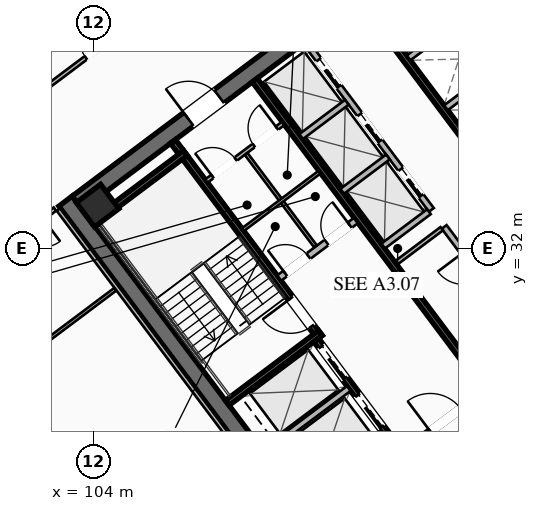
"""IFC4 building model, lengths in metres.
Left out: names, types, materials, properties, quantities, classifications, styles, units other than length and angle.
Written with IfcOpenShell. Run it as: python <this file> out.ifc"""

import sys

from ifc_helpers import new_model, si_unit, direction, frame, frame_2d, origin, origin_2d, place, context, subcontext, project, spatial, rectangle, hollow_rectangle, extrude, element, fill, save


model = new_model("IFC4")
c1 = context("Model", 3, precision=1e-05, world=origin(), true_north=direction((0.0, 1.0)))
c2 = subcontext(c1, "Body", "Model", "MODEL_VIEW")
j1 = project(units=[si_unit("LENGTHUNIT", "METRE"), si_unit("PLANEANGLEUNIT", "RADIAN")], contexts=[c1])
p1 = place(None, origin())
s1 = spatial("IfcSite", under=j1, at=p1, CompositionType="ELEMENT")
p2 = place(p1, origin())
s2 = spatial("IfcBuilding", under=s1, at=p2, CompositionType="ELEMENT")
p3 = place(p2, frame((0.0, 0.0, 146.35)))
s3 = spatial("IfcBuildingStorey", under=s2, at=p3, CompositionType="ELEMENT", Elevation=146.35)
for number, where, z_axis, x_axis in (
    (1, (112.436, 21.077, 0.0), (0.0, 0.0, 1.0), (-0.6, 0.8, 0.0)),
    (2, (115.564, 42.923, 0.0), (0.0, 0.0, 1.0), (0.6, -0.8, 0.0)),
):
    element("IfcWall", number, at=place(p3, frame(where, z_axis=z_axis, x_axis=x_axis)), inside=s3, PredefinedType="SHEAR", context=c2, shape_type="SweptSolid", body=[
        extrude(rectangle(XDim=15.6, YDim=0.55, at=frame_2d((7.8, 0.0))), origin(), (0.0, 0.0, 1.0), 3.55),
    ])
p4 = place(p3, frame((124.539, 30.498, 0.0), z_axis=(0.0, 0.0, 1.0), x_axis=(-0.799998054672, -0.600002593761, 0.0)))
e3 = element("IfcWall", 3, at=p4, inside=s3, PredefinedType="SHEAR", context=c2, shape_type="SweptSolid", body=[
    extrude(rectangle(XDim=15.06, YDim=0.55, at=frame_2d((7.53, 0.0))), origin(), (0.0, 0.0, 1.0), 3.55),
])
p5 = place(p4, frame((9.23, 0.0, 0.0)))
e4 = element("IfcOpeningElement", 4, at=p5, cuts=e3, PredefinedType="OPENING", context=c2, shape_type="SweptSolid", body=[
    extrude(rectangle(XDim=1.25, YDim=2.25, at=frame_2d((0.625, 1.125))), frame((0.0, 0.285, 0.0), z_axis=(0.0, -1.0, 0.0), x_axis=(1.0, 0.0, 0.0)), (0.0, 0.0, 1.0), 0.57),
])
p6 = place(p4, frame((4.18, 0.0, 0.0)))
e5 = element("IfcOpeningElement", 5, at=p6, cuts=e3, PredefinedType="OPENING", context=c2, shape_type="SweptSolid", body=[
    extrude(rectangle(XDim=1.25, YDim=2.25, at=frame_2d((0.625, 1.125))), frame((0.0, 0.285, 0.0), z_axis=(0.0, -1.0, 0.0), x_axis=(1.0, 0.0, 0.0)), (0.0, 0.0, 1.0), 0.57),
])
p7 = place(p3, frame((103.461, 33.502, 0.0), z_axis=(0.0, 0.0, 1.0), x_axis=(0.799998054672, 0.600002593761, 0.0)))
e6 = element("IfcWall", 6, at=p7, inside=s3, PredefinedType="SHEAR", context=c2, shape_type="SweptSolid", body=[
    extrude(rectangle(XDim=15.06, YDim=0.55, at=frame_2d((7.53, 0.0))), origin(), (0.0, 0.0, 1.0), 3.55),
])
p8 = place(p7, frame((4.58, 0.0, 0.0)))
e7 = element("IfcOpeningElement", 7, at=p8, cuts=e6, PredefinedType="OPENING", context=c2, shape_type="SweptSolid", body=[
    extrude(rectangle(XDim=1.25, YDim=2.25, at=frame_2d((0.625, 1.125))), frame((0.0, 0.285, 0.0), z_axis=(0.0, -1.0, 0.0), x_axis=(1.0, 0.0, 0.0)), (0.0, 0.0, 1.0), 0.57),
])
p9 = place(p7, frame((9.63, 0.0, 0.0)))
e8 = element("IfcOpeningElement", 8, at=p9, cuts=e6, PredefinedType="OPENING", context=c2, shape_type="SweptSolid", body=[
    extrude(rectangle(XDim=1.25, YDim=2.25, at=frame_2d((0.625, 1.125))), frame((0.0, 0.285, 0.0), z_axis=(0.0, -1.0, 0.0), x_axis=(1.0, 0.0, 0.0)), (0.0, 0.0, 1.0), 0.57),
])
p10 = place(p3, frame((104.13, 33.41, 0.0), z_axis=(0.0, 0.0, 1.0), x_axis=(0.799999996291, 0.600000004945, 0.0)))
e9 = element("IfcColumn", 9, at=p10, inside=s3, PredefinedType="COLUMN", context=c2, shape_type="SweptSolid", body=[
    extrude(hollow_rectangle(XDim=1.0, YDim=1.0, WallThickness=0.04, at=origin_2d()), origin(), (0.0, 0.0, 1.0), 3.37),
])
p11 = place(p3, frame((111.44, 29.08, 0.0), z_axis=(0.0, 0.0, 1.0), x_axis=(-0.59999029481, 0.8000072788, 0.0)))
e10 = element("IfcWall", 10, at=p11, inside=s3, PredefinedType="SHEAR", context=c2, shape_type="SweptSolid", body=[
    extrude(rectangle(XDim=8.05, YDim=0.2, at=frame_2d((4.025, 0.0))), origin(), (0.0, 0.0, 1.0), 3.37),
])
p12 = place(p11, frame((0.45, 0.0, 0.0)))
e11 = element("IfcOpeningElement", 11, at=p12, cuts=e10, PredefinedType="OPENING", context=c2, shape_type="SweptSolid", body=[
    extrude(rectangle(XDim=1.15, YDim=2.2, at=frame_2d((0.575, 1.1))), frame((0.0, 0.11, 0.0), z_axis=(0.0, -1.0, 0.0), x_axis=(1.0, 0.0, 0.0)), (0.0, 0.0, 1.0), 0.22),
])
for number, where, z_axis, x_axis in (
    (12, (108.396, 26.922, 0.0), (0.0, 0.0, 1.0), (0.8, 0.6, 0.0)),
    (13, (103.956, 32.842, 0.0), (0.0, 0.0, 1.0), (0.8, 0.6, 0.0)),
):
    element("IfcWall", number, at=place(p3, frame(where, z_axis=z_axis, x_axis=x_axis)), inside=s3, PredefinedType="SHEAR", context=c2, shape_type="SweptSolid", body=[
        extrude(rectangle(XDim=3.83, YDim=0.2, at=frame_2d((1.915, 0.0))), origin(), (0.0, 0.0, 1.0), 3.37),
    ])
p13 = place(p3, frame((117.998, 25.936, 0.0), z_axis=(0.0, 0.0, 1.0), x_axis=(-0.600002693989, 0.799997979501, 0.0)))
e14 = element("IfcWall", 14, at=p13, inside=s3, PredefinedType="SHEAR", context=c2, shape_type="SweptSolid", body=[
    extrude(rectangle(XDim=14.5, YDim=0.2, at=frame_2d((7.25, 0.0))), origin(), (0.0, 0.0, 1.0), 3.37),
])
p14 = place(p3, frame((110.104, 31.028, 0.0), z_axis=(0.0, 0.0, 1.0), x_axis=(0.800018601094, 0.59997519774, 0.0)))
e15 = element("IfcWall", 15, at=p14, inside=s3, PredefinedType="SOLIDWALL", context=c2, shape_type="SweptSolid", body=[
    extrude(rectangle(XDim=3.15, YDim=0.22, at=frame_2d((1.575, 0.0))), origin(), (0.0, 0.0, 1.0), 2.723),
])
p15 = place(p14, frame((0.25, 0.0, 0.0)))
e16 = element("IfcOpeningElement", 16, at=p15, cuts=e15, PredefinedType="OPENING", context=c2, shape_type="SweptSolid", body=[
    extrude(rectangle(XDim=0.95, YDim=2.05, at=frame_2d((0.475, 1.025))), frame((0.0, 0.12, 0.0), z_axis=(0.0, -1.0, 0.0), x_axis=(1.0, 0.0, 0.0)), (0.0, 0.0, 1.0), 0.24),
])
p16 = place(p14, frame((1.95, 0.0, 0.0)))
e17 = element("IfcOpeningElement", 17, at=p16, cuts=e15, PredefinedType="OPENING", context=c2, shape_type="SweptSolid", body=[
    extrude(rectangle(XDim=0.95, YDim=2.05, at=frame_2d((0.475, 1.025))), frame((0.0, 0.12, 0.0), z_axis=(0.0, -1.0, 0.0), x_axis=(1.0, 0.0, 0.0)), (0.0, 0.0, 1.0), 0.24),
])
p17 = place(p3, frame((114.316, 25.412, 0.0), z_axis=(0.0, 0.0, 1.0), x_axis=(0.800018601094, 0.59997519774, 0.0)))
e18 = element("IfcWall", 18, at=p17, inside=s3, PredefinedType="SOLIDWALL", context=c2, shape_type="SweptSolid", body=[
    extrude(rectangle(XDim=3.15, YDim=0.22, at=frame_2d((1.575, 0.0))), origin(), (0.0, 0.0, 1.0), 2.723),
])
p18 = place(p17, frame((0.95, 0.0, 0.0)))
e19 = element("IfcOpeningElement", 19, at=p18, cuts=e18, PredefinedType="OPENING", context=c2, shape_type="SweptSolid", body=[
    extrude(rectangle(XDim=1.25, YDim=2.25, at=frame_2d((0.625, 1.125))), frame((0.0, 0.12, 0.0), z_axis=(0.0, -1.0, 0.0), x_axis=(1.0, 0.0, 0.0)), (0.0, 0.0, 1.0), 0.24),
])
p19 = place(p3, frame((115.19, 23.83, 0.0), z_axis=(0.0, 0.0, 1.0), x_axis=(-0.599993943644, 0.800004542231, 0.0)))
e20 = element("IfcWall", 20, at=p19, inside=s3, PredefinedType="SHEAR", context=c2, shape_type="SweptSolid", body=[
    extrude(rectangle(XDim=6.45, YDim=0.2, at=frame_2d((3.225, 0.0))), origin(), (0.0, 0.0, 1.0), 3.37),
])
p20 = place(p19, frame((4.875, 0.0, 0.0)))
e21 = element("IfcOpeningElement", 21, at=p20, cuts=e20, PredefinedType="OPENING", context=c2, shape_type="SweptSolid", body=[
    extrude(rectangle(XDim=1.3, YDim=2.25, at=frame_2d((0.65, 1.125))), frame((0.0, 0.11, 0.0), z_axis=(0.0, -1.0, 0.0), x_axis=(1.0, 0.0, 0.0)), (0.0, 0.0, 1.0), 0.22),
])
p21 = place(p19, frame((2.875, 0.0, 0.0)))
e22 = element("IfcOpeningElement", 22, at=p21, cuts=e20, PredefinedType="OPENING", context=c2, shape_type="SweptSolid", body=[
    extrude(rectangle(XDim=1.3, YDim=2.25, at=frame_2d((0.65, 1.125))), frame((0.0, 0.11, 0.0), z_axis=(0.0, -1.0, 0.0), x_axis=(1.0, 0.0, 0.0)), (0.0, 0.0, 1.0), 0.22),
])
p22 = place(p19, frame((0.675, 0.0, 0.0)))
e23 = element("IfcOpeningElement", 23, at=p22, cuts=e20, PredefinedType="OPENING", context=c2, shape_type="SweptSolid", body=[
    extrude(rectangle(XDim=1.3, YDim=2.25, at=frame_2d((0.65, 1.125))), frame((0.0, 0.11, 0.0), z_axis=(0.0, -1.0, 0.0), x_axis=(1.0, 0.0, 0.0)), (0.0, 0.0, 1.0), 0.22),
])
p23 = place(p3, frame((109.608, 25.306, 0.0), z_axis=(0.0, 0.0, 1.0), x_axis=(0.8, 0.6, 0.0)))
e24 = element("IfcWall", 24, at=p23, inside=s3, PredefinedType="SOLIDWALL", context=c2, shape_type="SweptSolid", body=[
    extrude(rectangle(XDim=3.48, YDim=0.2, at=frame_2d((1.74, 0.0))), origin(), (0.0, 0.0, 1.0), 3.37),
])
p24 = place(p3, frame((112.81, 40.17, 0.0), z_axis=(0.0, 0.0, 1.0), x_axis=(0.599993943644, -0.800004542231, 0.0)))
e25 = element("IfcWall", 25, at=p24, inside=s3, PredefinedType="SHEAR", context=c2, shape_type="SweptSolid", body=[
    extrude(rectangle(XDim=6.45, YDim=0.2, at=frame_2d((3.225, 0.0))), origin(), (0.0, 0.0, 1.0), 3.37),
])
for number, where, z_axis, x_axis in (
    (26, (115.59, 36.63, 0.0), (0.0, 0.0, 1.0), (0.8, 0.6, 0.0)),
    (27, (114.36, 38.27, 0.0), (0.0, 0.0, 1.0), (0.8, 0.6, 0.0)),
):
    element("IfcWall", number, at=place(p3, frame(where, z_axis=z_axis, x_axis=x_axis)), inside=s3, PredefinedType="SOLIDWALL", context=c2, shape_type="SweptSolid", body=[
        extrude(rectangle(XDim=3.48, YDim=0.2, at=frame_2d((1.74, 0.0))), origin(), (0.0, 0.0, 1.0), 3.37),
    ])
p25 = place(p3, frame((107.71, 34.22, 0.0), z_axis=(0.0, 0.0, 1.0), x_axis=(0.799981399002, 0.60002480053, 0.0)))
e28 = element("IfcWall", 28, at=p25, inside=s3, PredefinedType="PARTITIONING", context=c2, shape_type="SweptSolid", body=[
    extrude(rectangle(XDim=3.15, YDim=0.135, at=frame_2d((1.575, 0.0))), origin(), (0.0, 0.0, 1.0), 2.723),
])
p26 = place(p25, frame((0.25, 0.0, 0.0)))
e29 = element("IfcOpeningElement", 29, at=p26, cuts=e28, PredefinedType="OPENING", context=c2, shape_type="SweptSolid", body=[
    extrude(rectangle(XDim=0.95, YDim=2.05, at=frame_2d((0.475, 1.025))), frame((0.0, 0.077, 0.0), z_axis=(0.0, -1.0, 0.0), x_axis=(1.0, 0.0, 0.0)), (0.0, 0.0, 1.0), 0.155),
])
p27 = place(p25, frame((1.95, 0.0, 0.0)))
e30 = element("IfcOpeningElement", 30, at=p27, cuts=e28, PredefinedType="OPENING", context=c2, shape_type="SweptSolid", body=[
    extrude(rectangle(XDim=0.95, YDim=2.05, at=frame_2d((0.475, 1.025))), frame((0.0, 0.077, 0.0), z_axis=(0.0, -1.0, 0.0), x_axis=(1.0, 0.0, 0.0)), (0.0, 0.0, 1.0), 0.155),
])
p28 = place(p3, frame((111.296, 32.072, 0.0), z_axis=(0.0, 0.0, 1.0), x_axis=(-0.59995887973, 0.800030838552, 0.0)))
e31 = element("IfcWall", 31, at=p28, inside=s3, PredefinedType="PARTITIONING", context=c2, shape_type="SweptSolid", body=[
    extrude(rectangle(XDim=3.8, YDim=0.11, at=frame_2d((1.9, 0.0))), origin(), (0.0, 0.0, 1.0), 2.723),
])
p29 = place(p3, frame((108.91, 32.62, 0.0), z_axis=(0.0, 0.0, 1.0), x_axis=(0.800018601094, 0.59997519774, 0.0)))
e32 = element("IfcWall", 32, at=p29, inside=s3, PredefinedType="PARTITIONING", context=c2, shape_type="SweptSolid", body=[
    extrude(rectangle(XDim=3.15, YDim=0.11, at=frame_2d((1.575, 0.0))), origin(), (0.0, 0.0, 1.0), 2.723),
])
p30 = place(p3, frame((119.67, 27.19, 0.0), z_axis=(0.0, 0.0, 1.0), x_axis=(-0.599988677396, 0.800008491828, 0.0)))
e33 = element("IfcWall", 33, at=p30, inside=s3, PredefinedType="SOLIDWALL", context=c2, shape_type="SweptSolid", body=[
    extrude(rectangle(XDim=6.9, YDim=0.2, at=frame_2d((3.45, 0.0))), origin(), (0.0, 0.0, 1.0), 2.723),
])
p31 = place(p30, frame((0.85, 0.0, 0.0)))
e34 = element("IfcOpeningElement", 34, at=p31, cuts=e33, PredefinedType="OPENING", context=c2, shape_type="SweptSolid", body=[
    extrude(rectangle(XDim=0.95, YDim=2.05, at=frame_2d((0.475, 1.025))), frame((0.0, 0.11, 0.0), z_axis=(0.0, -1.0, 0.0), x_axis=(1.0, 0.0, 0.0)), (0.0, 0.0, 1.0), 0.22),
])
p32 = place(p30, frame((4.8, 0.0, 0.0)))
e35 = element("IfcOpeningElement", 35, at=p32, cuts=e33, PredefinedType="OPENING", context=c2, shape_type="SweptSolid", body=[
    extrude(rectangle(XDim=1.05, YDim=2.2, at=frame_2d((0.525, 1.1))), frame((0.0, 0.11, 0.0), z_axis=(0.0, -1.0, 0.0), x_axis=(1.0, 0.0, 0.0)), (0.0, 0.0, 1.0), 0.22),
])
p33 = place(p3, frame((113.946, 31.522, 0.0), z_axis=(0.0, 0.0, 1.0), x_axis=(0.8, 0.6, 0.0)))
e36 = element("IfcWall", 36, at=p33, inside=s3, PredefinedType="PARTITIONING", context=c2, shape_type="SweptSolid", body=[
    extrude(rectangle(XDim=1.88, YDim=0.135, at=frame_2d((0.94, 0.0))), origin(), (0.0, 0.0, 1.0), 2.723),
])
p34 = place(p3, frame((115.11, 33.27, 0.0), z_axis=(0.0, 0.0, 1.0), x_axis=(-0.600011322243, 0.799991508192, 0.0)))
e37 = element("IfcWall", 37, at=p34, inside=s3, PredefinedType="SOLIDWALL", context=c2, shape_type="SweptSolid", body=[
    extrude(rectangle(XDim=6.9, YDim=0.2, at=frame_2d((3.45, 0.0))), origin(), (0.0, 0.0, 1.0), 3.37),
])
p35 = place(p34, frame((0.575, 0.0, 0.0)))
e38 = element("IfcOpeningElement", 38, at=p35, cuts=e37, PredefinedType="OPENING", context=c2, shape_type="SweptSolid", body=[
    extrude(rectangle(XDim=1.1, YDim=2.2, at=frame_2d((0.55, 1.1))), frame((0.0, 0.11, 0.0), z_axis=(0.0, -1.0, 0.0), x_axis=(1.0, 0.0, 0.0)), (0.0, 0.0, 1.0), 0.22),
])
p36 = place(p34, frame((2.825, 0.0, 0.0)))
e39 = element("IfcOpeningElement", 39, at=p36, cuts=e37, PredefinedType="OPENING", context=c2, shape_type="SweptSolid", body=[
    extrude(rectangle(XDim=1.1, YDim=2.2, at=frame_2d((0.55, 1.1))), frame((0.0, 0.11, 0.0), z_axis=(0.0, -1.0, 0.0), x_axis=(1.0, 0.0, 0.0)), (0.0, 0.0, 1.0), 0.22),
])
p37 = place(p34, frame((5.075, 0.0, 0.0)))
e40 = element("IfcOpeningElement", 40, at=p37, cuts=e37, PredefinedType="OPENING", context=c2, shape_type="SweptSolid", body=[
    extrude(rectangle(XDim=1.1, YDim=2.2, at=frame_2d((0.55, 1.1))), frame((0.0, 0.11, 0.0), z_axis=(0.0, -1.0, 0.0), x_axis=(1.0, 0.0, 0.0)), (0.0, 0.0, 1.0), 0.22),
])
p38 = place(p3, frame((113.526, 32.082, 0.0), z_axis=(0.0, 0.0, 1.0), x_axis=(0.800046745961, 0.599937666993, 0.0)))
e41 = element("IfcWall", 41, at=p38, inside=s3, PredefinedType="SOLIDWALL", context=c2, shape_type="SweptSolid", body=[
    extrude(rectangle(XDim=1.88, YDim=0.2, at=frame_2d((0.94, 0.0))), origin(), (0.0, 0.0, 1.0), 3.37),
])
p39 = place(p3, frame((112.176, 33.882, 0.0), z_axis=(0.0, 0.0, 1.0), x_axis=(0.8, 0.6, 0.0)))
e42 = element("IfcWall", 42, at=p39, inside=s3, PredefinedType="SOLIDWALL", context=c2, shape_type="SweptSolid", body=[
    extrude(rectangle(XDim=1.88, YDim=0.2, at=frame_2d((0.94, 0.0))), origin(), (0.0, 0.0, 1.0), 3.37),
])
p40 = place(p3, frame((110.826, 35.682, 0.0), z_axis=(0.0, 0.0, 1.0), x_axis=(0.799984418148, 0.600020775241, 0.0)))
e43 = element("IfcWall", 43, at=p40, inside=s3, PredefinedType="SOLIDWALL", context=c2, shape_type="SweptSolid", body=[
    extrude(rectangle(XDim=1.88, YDim=0.2, at=frame_2d((0.94, 0.0))), origin(), (0.0, 0.0, 1.0), 3.37),
])
p41 = place(p3, frame((94.778, 31.546, 0.0), z_axis=(0.0, 0.0, 1.0), x_axis=(0.8, 0.6, 0.0)))
e44 = element("IfcWall", 44, at=p41, inside=s3, PredefinedType="PARTITIONING", context=c2, shape_type="SweptSolid", body=[
    extrude(rectangle(XDim=31.3, YDim=0.135, at=frame_2d((15.65, 0.0))), origin(), (0.0, 0.0, 1.0), 2.723),
])
p42 = place(p41, frame((0.3, 0.0, 0.0)))
e45 = element("IfcOpeningElement", 45, at=p42, cuts=e44, PredefinedType="OPENING", context=c2, shape_type="SweptSolid", body=[
    extrude(rectangle(XDim=0.95, YDim=2.05, at=frame_2d((0.475, 1.025))), frame((0.0, 0.077, 0.0), z_axis=(0.0, -1.0, 0.0), x_axis=(1.0, 0.0, 0.0)), (0.0, 0.0, 1.0), 0.155),
])
p43 = place(p41, frame((11.21, 0.0, 0.0)))
e46 = element("IfcOpeningElement", 46, at=p43, cuts=e44, PredefinedType="OPENING", context=c2, shape_type="SweptSolid", body=[
    extrude(rectangle(XDim=0.95, YDim=2.05, at=frame_2d((0.475, 1.025))), frame((0.0, 0.077, 0.0), z_axis=(0.0, -1.0, 0.0), x_axis=(1.0, 0.0, 0.0)), (0.0, 0.0, 1.0), 0.155),
])
p44 = place(p41, frame((15.487, 0.0, 0.0)))
e47 = element("IfcOpeningElement", 47, at=p44, cuts=e44, PredefinedType="OPENING", context=c2, shape_type="SweptSolid", body=[
    extrude(rectangle(XDim=0.95, YDim=2.05, at=frame_2d((0.475, 1.025))), frame((0.0, 0.077, 0.0), z_axis=(0.0, -1.0, 0.0), x_axis=(1.0, 0.0, 0.0)), (0.0, 0.0, 1.0), 0.155),
])
p45 = place(p41, frame((30.05, 0.0, 0.0)))
e48 = element("IfcOpeningElement", 48, at=p45, cuts=e44, PredefinedType="OPENING", context=c2, shape_type="SweptSolid", body=[
    extrude(rectangle(XDim=0.95, YDim=2.05, at=frame_2d((0.475, 1.025))), frame((0.0, 0.077, 0.0), z_axis=(0.0, -1.0, 0.0), x_axis=(1.0, 0.0, 0.0)), (0.0, 0.0, 1.0), 0.155),
])
p46 = place(p3, frame((132.13, 33.91, 0.0), z_axis=(0.0, 0.0, 1.0), x_axis=(-0.799997191971, -0.600003744021, 0.0)))
e49 = element("IfcWall", 49, at=p46, inside=s3, PredefinedType="PARTITIONING", context=c2, shape_type="SweptSolid", body=[
    extrude(rectangle(XDim=31.3, YDim=0.135, at=frame_2d((15.65, 0.0))), origin(), (0.0, 0.0, 1.0), 2.723),
])
p47 = place(p46, frame((29.97, 0.0, 0.0)))
e50 = element("IfcOpeningElement", 50, at=p47, cuts=e49, PredefinedType="OPENING", context=c2, shape_type="SweptSolid", body=[
    extrude(rectangle(XDim=0.95, YDim=2.05, at=frame_2d((0.475, 1.025))), frame((0.0, 0.077, 0.0), z_axis=(0.0, -1.0, 0.0), x_axis=(1.0, 0.0, 0.0)), (0.0, 0.0, 1.0), 0.155),
])
p48 = place(p46, frame((0.38, 0.0, 0.0)))
e51 = element("IfcOpeningElement", 51, at=p48, cuts=e49, PredefinedType="OPENING", context=c2, shape_type="SweptSolid", body=[
    extrude(rectangle(XDim=0.95, YDim=2.05, at=frame_2d((0.475, 1.025))), frame((0.0, 0.077, 0.0), z_axis=(0.0, -1.0, 0.0), x_axis=(1.0, 0.0, 0.0)), (0.0, 0.0, 1.0), 0.155),
])
p49 = place(p3, frame((112.104, 20.928, 0.0), z_axis=(0.0, 0.0, 1.0), x_axis=(-0.599994940075, 0.800003794918, 0.0)))
e52 = element("IfcWall", 52, at=p49, inside=s3, PredefinedType="PARTITIONING", context=c2, shape_type="SweptSolid", body=[
    extrude(rectangle(XDim=15.44, YDim=0.135, at=frame_2d((7.72, 0.0))), origin(), (0.0, 0.0, 1.0), 2.723),
])
p50 = place(p3, frame((102.728, 33.296, 0.0), z_axis=(0.0, 0.0, 1.0), x_axis=(-0.800002918023, -0.599996109283, 0.0)))
e53 = element("IfcWall", 53, at=p50, inside=s3, PredefinedType="PARTITIONING", context=c2, shape_type="SweptSolid", body=[
    extrude(rectangle(XDim=10.04, YDim=0.135, at=frame_2d((5.02, 0.0))), origin(), (0.0, 0.0, 1.0), 2.723),
])
p51 = place(p50, frame((0.5, 0.0, 0.0)))
e54 = element("IfcOpeningElement", 54, at=p51, cuts=e53, PredefinedType="OPENING", context=c2, shape_type="SweptSolid", body=[
    extrude(rectangle(XDim=0.95, YDim=2.05, at=frame_2d((0.475, 1.025))), frame((0.0, 0.077, 0.0), z_axis=(0.0, -1.0, 0.0), x_axis=(1.0, 0.0, 0.0)), (0.0, 0.0, 1.0), 0.155),
])
p52 = place(p3, frame((96.676, 24.632, 0.0), z_axis=(0.0, 0.0, 1.0), x_axis=(0.800002918023, 0.599996109283, 0.0)))
e55 = element("IfcWall", 55, at=p52, inside=s3, PredefinedType="PARTITIONING", context=c2, shape_type="SweptSolid", body=[
    extrude(rectangle(XDim=10.04, YDim=0.11, at=frame_2d((5.02, 0.0))), origin(), (0.0, 0.0, 1.0), 2.723),
])
p53 = place(p8, origin())
e56 = element("IfcDoor", 56, at=p53, inside=s3, OperationType="SINGLE_SWING_LEFT", PredefinedType="DOOR", context=c2, shape_type="SweptSolid", body=[
    extrude(rectangle(XDim=1.25, YDim=2.25, at=frame_2d((0.625, 1.125))), frame((0.0, 0.025, 0.0), z_axis=(0.0, -1.0, 0.0), x_axis=(1.0, 0.0, 0.0)), (0.0, 0.0, 1.0), 0.05),
])
fill(e7, e56)
p54 = place(p12, origin())
e57 = element("IfcDoor", 57, at=p54, inside=s3, OperationType="SINGLE_SWING_RIGHT", PredefinedType="DOOR", context=c2, shape_type="SweptSolid", body=[
    extrude(rectangle(XDim=1.15, YDim=2.2, at=frame_2d((0.575, 1.1))), frame((0.0, 0.025, 0.0), z_axis=(0.0, -1.0, 0.0), x_axis=(1.0, 0.0, 0.0)), (0.0, 0.0, 1.0), 0.05),
])
fill(e11, e57)
p55 = place(p18, origin())
e58 = element("IfcDoor", 58, at=p55, inside=s3, OperationType="SINGLE_SWING_LEFT", PredefinedType="DOOR", context=c2, shape_type="SweptSolid", body=[
    extrude(rectangle(XDim=1.25, YDim=2.25, at=frame_2d((0.625, 1.125))), frame((0.0, 0.025, 0.0), z_axis=(0.0, -1.0, 0.0), x_axis=(1.0, 0.0, 0.0)), (0.0, 0.0, 1.0), 0.05),
])
fill(e19, e58)
p56 = place(p26, origin())
e59 = element("IfcDoor", 59, at=p56, inside=s3, OperationType="SINGLE_SWING_LEFT", PredefinedType="DOOR", context=c2, shape_type="SweptSolid", body=[
    extrude(rectangle(XDim=0.95, YDim=2.05, at=frame_2d((0.475, 1.025))), frame((0.0, 0.025, 0.0), z_axis=(0.0, -1.0, 0.0), x_axis=(1.0, 0.0, 0.0)), (0.0, 0.0, 1.0), 0.05),
])
fill(e29, e59)
p57 = place(p27, origin())
e60 = element("IfcDoor", 60, at=p57, inside=s3, OperationType="SINGLE_SWING_RIGHT", PredefinedType="DOOR", context=c2, shape_type="SweptSolid", body=[
    extrude(rectangle(XDim=0.95, YDim=2.05, at=frame_2d((0.475, 1.025))), frame((0.0, 0.025, 0.0), z_axis=(0.0, -1.0, 0.0), x_axis=(1.0, 0.0, 0.0)), (0.0, 0.0, 1.0), 0.05),
])
fill(e30, e60)
p58 = place(p15, origin())
e61 = element("IfcDoor", 61, at=p58, inside=s3, OperationType="SINGLE_SWING_LEFT", PredefinedType="DOOR", context=c2, shape_type="SweptSolid", body=[
    extrude(rectangle(XDim=0.95, YDim=2.05, at=frame_2d((0.475, 1.025))), frame((0.0, 0.025, 0.0), z_axis=(0.0, -1.0, 0.0), x_axis=(1.0, 0.0, 0.0)), (0.0, 0.0, 1.0), 0.05),
])
fill(e16, e61)
p59 = place(p16, origin())
e62 = element("IfcDoor", 62, at=p59, inside=s3, OperationType="SINGLE_SWING_RIGHT", PredefinedType="DOOR", context=c2, shape_type="SweptSolid", body=[
    extrude(rectangle(XDim=0.95, YDim=2.05, at=frame_2d((0.475, 1.025))), frame((0.0, 0.025, 0.0), z_axis=(0.0, -1.0, 0.0), x_axis=(1.0, 0.0, 0.0)), (0.0, 0.0, 1.0), 0.05),
])
fill(e17, e62)
p60 = place(p43, origin())
e63 = element("IfcDoor", 63, at=p60, inside=s3, OperationType="SINGLE_SWING_RIGHT", PredefinedType="DOOR", context=c2, shape_type="SweptSolid", body=[
    extrude(rectangle(XDim=0.95, YDim=2.05, at=frame_2d((0.475, 1.025))), frame((0.0, 0.025, 0.0), z_axis=(0.0, -1.0, 0.0), x_axis=(1.0, 0.0, 0.0)), (0.0, 0.0, 1.0), 0.05),
])
fill(e46, e63)
p61 = place(p20, origin())
e64 = element("IfcDoor", 64, at=p61, inside=s3, OperationType="SLIDING_TO_LEFT", PredefinedType="DOOR", context=c2, shape_type="SweptSolid", body=[
    extrude(rectangle(XDim=1.3, YDim=2.25, at=frame_2d((0.65, 1.125))), frame((0.0, 0.025, 0.0), z_axis=(0.0, -1.0, 0.0), x_axis=(1.0, 0.0, 0.0)), (0.0, 0.0, 1.0), 0.05),
])
fill(e21, e64)
p62 = place(p21, origin())
e65 = element("IfcDoor", 65, at=p62, inside=s3, OperationType="SLIDING_TO_LEFT", PredefinedType="DOOR", context=c2, shape_type="SweptSolid", body=[
    extrude(rectangle(XDim=1.3, YDim=2.25, at=frame_2d((0.65, 1.125))), frame((0.0, 0.025, 0.0), z_axis=(0.0, -1.0, 0.0), x_axis=(1.0, 0.0, 0.0)), (0.0, 0.0, 1.0), 0.05),
])
fill(e22, e65)
p63 = place(p35, origin())
e66 = element("IfcDoor", 66, at=p63, inside=s3, OperationType="SLIDING_TO_LEFT", PredefinedType="DOOR", context=c2, shape_type="SweptSolid", body=[
    extrude(rectangle(XDim=1.1, YDim=2.2, at=frame_2d((0.55, 1.1))), frame((0.0, 0.025, 0.0), z_axis=(0.0, -1.0, 0.0), x_axis=(1.0, 0.0, 0.0)), (0.0, 0.0, 1.0), 0.05),
])
fill(e38, e66)
p64 = place(p36, origin())
e67 = element("IfcDoor", 67, at=p64, inside=s3, OperationType="SLIDING_TO_LEFT", PredefinedType="DOOR", context=c2, shape_type="SweptSolid", body=[
    extrude(rectangle(XDim=1.1, YDim=2.2, at=frame_2d((0.55, 1.1))), frame((0.0, 0.025, 0.0), z_axis=(0.0, -1.0, 0.0), x_axis=(1.0, 0.0, 0.0)), (0.0, 0.0, 1.0), 0.05),
])
fill(e39, e67)
p65 = place(p37, origin())
e68 = element("IfcDoor", 68, at=p65, inside=s3, OperationType="SLIDING_TO_LEFT", PredefinedType="DOOR", context=c2, shape_type="SweptSolid", body=[
    extrude(rectangle(XDim=1.1, YDim=2.2, at=frame_2d((0.55, 1.1))), frame((0.0, 0.025, 0.0), z_axis=(0.0, -1.0, 0.0), x_axis=(1.0, 0.0, 0.0)), (0.0, 0.0, 1.0), 0.05),
])
fill(e40, e68)
save(model, sys.argv[1])
